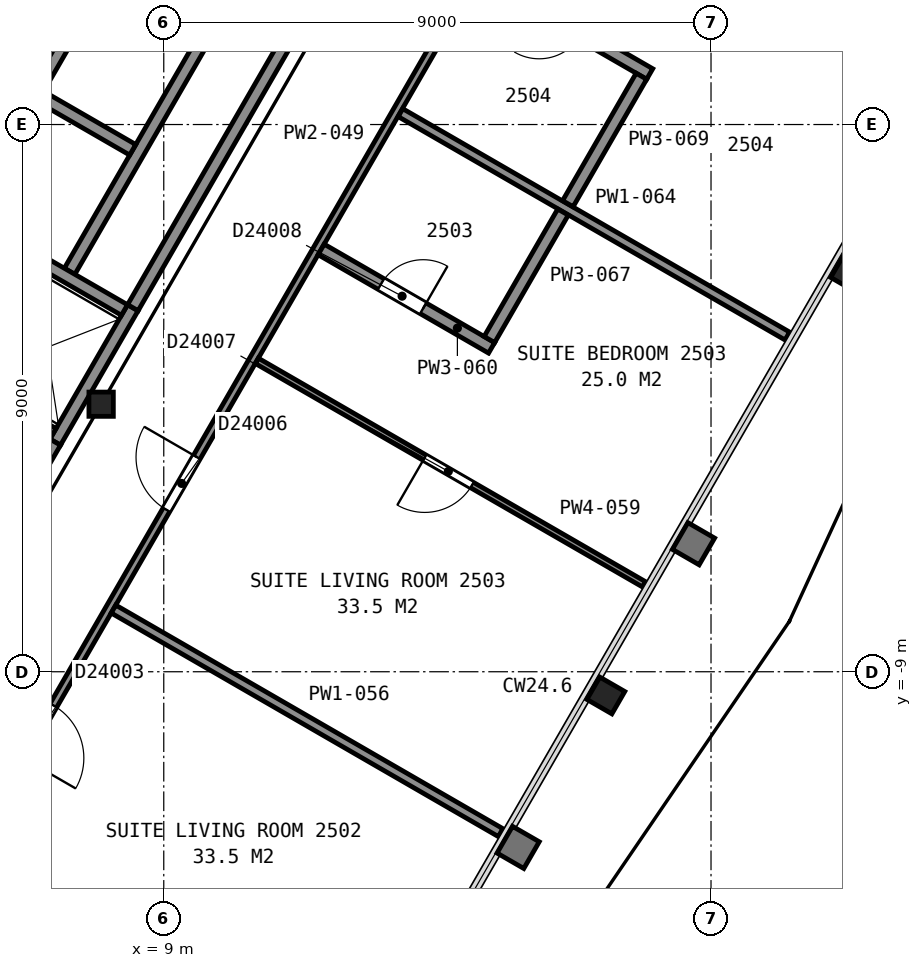
"""IFC4 building model, lengths in metres.
Left out: names, types, materials, properties, quantities, classifications, styles, units other than length and angle.
Written with IfcOpenShell. Run it as: python <this file> out.ifc"""

import sys

from ifc_helpers import new_model, si_unit, direction, frame, frame_2d, origin, origin_2d, place, context, subcontext, project, spatial, rectangle, i_section, extrude, element, fill, save


model = new_model("IFC4")
c1 = context("Model", 3, precision=1e-05, world=origin(), true_north=direction((0.0, 1.0)))
c2 = subcontext(c1, "Body", "Model", "MODEL_VIEW")
j1 = project(units=[si_unit("LENGTHUNIT", "METRE"), si_unit("PLANEANGLEUNIT", "RADIAN")], contexts=[c1])
p1 = place(None, origin())
s1 = spatial("IfcSite", under=j1, at=p1, CompositionType="ELEMENT")
p2 = place(p1, origin())
s2 = spatial("IfcBuilding", under=s1, at=p2, CompositionType="ELEMENT")
p3 = place(p2, frame((0.0, 0.0, 107.2)))
s3 = spatial("IfcBuildingStorey", under=s2, at=p3, CompositionType="ELEMENT", Elevation=107.2)
for number, where, z_axis, x_axis in (
    (1, (16.27, -9.39, 0.0), (0.0, 0.0, 1.0), (-0.5, -0.866, 0.0)),
    (2, (20.28, -2.45, 0.0), (0.0, 0.0, 1.0), (-0.5, -0.866, 0.0)),
):
    element("IfcColumn", number, at=place(p3, frame(where, z_axis=z_axis, x_axis=x_axis)), inside=s3, PredefinedType="COLUMN", context=c2, shape_type="SweptSolid", body=[
        extrude(i_section(OverallWidth=0.424, OverallDepth=0.475, WebThickness=0.048, FlangeThickness=0.077, FilletRadius=0.015, at=origin_2d()), origin(), (0.0, 0.0, 1.0), 3.6),
    ])
p4 = place(p3, frame((7.97, -4.6, 0.0), z_axis=(0.0, 0.0, 1.0), x_axis=(1.0, 0.0, 0.0)))
e3 = element("IfcColumn", 3, at=p4, inside=s3, PredefinedType="COLUMN", context=c2, shape_type="SweptSolid", body=[
    extrude(i_section(OverallWidth=0.401, OverallDepth=0.399, WebThickness=0.025, FlangeThickness=0.04, FilletRadius=0.015, at=origin_2d()), origin(), (0.0, 0.0, 1.0), 3.6),
])
p5 = place(p3, frame((7.216, -5.222, 0.0), z_axis=(0.0, 0.0, 1.0), x_axis=(0.499990435942, 0.866030925526, 0.0)))
e4 = element("IfcWall", 4, at=p5, inside=s3, PredefinedType="PARTITIONING", context=c2, shape_type="SweptSolid", body=[
    extrude(rectangle(XDim=2.55, YDim=0.2, at=frame_2d((1.275, 0.0))), origin(), (0.0, 0.0, 1.0), 3.6),
])
p6 = place(p3, frame((7.451, -2.414, 0.0), z_axis=(0.0, 0.0, 1.0), x_axis=(0.500016218704, 0.866016039709, 0.0)))
e5 = element("IfcWall", 5, at=p6, inside=s3, PredefinedType="PARTITIONING", context=c2, shape_type="SweptSolid", body=[
    extrude(rectangle(XDim=4.7, YDim=0.2, at=frame_2d((2.35, 0.0))), origin(), (0.0, 0.0, 1.0), 3.6),
])
p7 = place(p3, frame((5.663, -1.612, 0.0), z_axis=(0.0, 0.0, 1.0), x_axis=(0.49998122708, 0.866036242063, 0.0)))
e6 = element("IfcWall", 6, at=p7, inside=s3, PredefinedType="PARTITIONING", context=c2, shape_type="SweptSolid", body=[
    extrude(rectangle(XDim=4.9, YDim=0.2, at=frame_2d((2.45, 0.0))), origin(), (0.0, 0.0, 1.0), 3.6),
])
p8 = place(p3, frame((8.49, -0.416, 0.0), z_axis=(0.0, 0.0, 1.0), x_axis=(-0.866036909293, 0.499980071345, 0.0)))
e7 = element("IfcWall", 7, at=p8, inside=s3, PredefinedType="PARTITIONING", context=c2, shape_type="SweptSolid", body=[
    extrude(rectangle(XDim=1.75, YDim=0.2, at=frame_2d((0.875, 0.0))), origin(), (0.0, 0.0, 1.0), 3.6),
])
p9 = place(p3, frame((8.354, -3.051, 0.0), z_axis=(0.0, 0.0, 1.0), x_axis=(-0.866060182126, 0.499939757307, 0.0)))
e8 = element("IfcWall", 8, at=p9, inside=s3, PredefinedType="PARTITIONING", context=c2, shape_type="SweptSolid", body=[
    extrude(rectangle(XDim=2.95, YDim=0.2, at=frame_2d((1.475, 0.0))), origin(), (0.0, 0.0, 1.0), 3.6),
])
p10 = place(p3, frame((7.179, -5.086, 0.0), z_axis=(0.0, 0.0, 1.0), x_axis=(-0.866036909293, 0.499980071345, 0.0)))
e9 = element("IfcWall", 9, at=p10, inside=s3, PredefinedType="PARTITIONING", context=c2, shape_type="SweptSolid", body=[
    extrude(rectangle(XDim=1.75, YDim=0.2, at=frame_2d((0.875, 0.0))), origin(), (0.0, 0.0, 1.0), 3.6),
])
p11 = place(p3, frame((5.906, -7.49, 0.0), z_axis=(0.0, 0.0, 1.0), x_axis=(0.500252727967, 0.865879442048, 0.0)))
e10 = element("IfcWall", 10, at=p11, inside=s3, PredefinedType="PARTITIONING", context=c2, shape_type="SweptSolid", body=[
    extrude(rectangle(XDim=2.617, YDim=0.2, at=frame_2d((1.309, 0.0))), origin(), (0.0, 0.0, 1.0), 3.35),
])
p12 = place(p3, frame((8.492, -3.012, 0.0), z_axis=(0.0, 0.0, 1.0), x_axis=(0.499972957231, 0.866041016371, 0.0)))
e11 = element("IfcWall", 11, at=p12, inside=s3, PredefinedType="PARTITIONING", context=c2, shape_type="SweptSolid", body=[
    extrude(rectangle(XDim=10.349, YDim=0.2, at=frame_2d((5.174, 0.0))), origin(), (0.0, 0.0, 1.0), 3.35),
])
p13 = place(p3, frame((15.684, 5.165, 0.0), z_axis=(0.0, 0.0, 1.0), x_axis=(-0.500027787016, -0.866009360349, 0.0)))
e12 = element("IfcWall", 12, at=p13, inside=s3, PredefinedType="PARTITIONING", context=c2, shape_type="SweptSolid", body=[
    extrude(rectangle(XDim=23.856, YDim=0.125, at=frame_2d((11.928, 0.0))), origin(), (0.0, 0.0, 1.0), 2.613),
])
p14 = place(p13, frame((16.996, 0.0, 0.0)))
e13 = element("IfcOpeningElement", 13, at=p14, cuts=e12, PredefinedType="OPENING", context=c2, shape_type="SweptSolid", body=[
    extrude(rectangle(XDim=1.0, YDim=2.1, at=frame_2d((0.5, 1.05))), frame((0.0, 0.073, 0.0), z_axis=(0.0, -1.0, 0.0), x_axis=(1.0, 0.0, 0.0)), (0.0, 0.0, 1.0), 0.145),
])
p15 = place(p13, frame((12.28, 0.0, 0.0)))
e14 = element("IfcOpeningElement", 14, at=p15, cuts=e12, PredefinedType="OPENING", context=c2, shape_type="SweptSolid", body=[
    extrude(rectangle(XDim=1.0, YDim=2.1, at=frame_2d((0.5, 1.05))), frame((0.0, 0.073, 0.0), z_axis=(0.0, -1.0, 0.0), x_axis=(1.0, 0.0, 0.0)), (0.0, 0.0, 1.0), 0.145),
])
p16 = place(p3, frame((12.183, -15.729, 0.0), z_axis=(0.0, 0.0, 1.0), x_axis=(-0.866066702559, 0.499928461601, 0.0)))
e15 = element("IfcWall", 15, at=p16, inside=s3, PredefinedType="PARTITIONING", context=c2, shape_type="SweptSolid", body=[
    extrude(rectangle(XDim=7.352, YDim=0.1, at=frame_2d((3.676, 0.0))), origin(), (0.0, 0.0, 1.0), 2.613),
])
p17 = place(p16, frame((3.265, 0.0, 0.0)))
e16 = element("IfcOpeningElement", 16, at=p17, cuts=e15, PredefinedType="OPENING", context=c2, shape_type="SweptSolid", body=[
    extrude(rectangle(XDim=0.9, YDim=2.1, at=frame_2d((0.45, 1.05))), frame((0.0, 0.06, 0.0), z_axis=(0.0, -1.0, 0.0), x_axis=(1.0, 0.0, 0.0)), (0.0, 0.0, 1.0), 0.12),
])
p18 = place(p3, frame((8.173, -7.969, 0.0), z_axis=(0.0, 0.0, 1.0), x_axis=(0.86596990005, -0.500096122968, 0.0)))
e17 = element("IfcWall", 17, at=p18, inside=s3, PredefinedType="PARTITIONING", context=c2, shape_type="SweptSolid", body=[
    extrude(rectangle(XDim=7.352, YDim=0.15, at=frame_2d((3.676, 0.0))), origin(), (0.0, 0.0, 1.0), 2.613),
])
p19 = place(p3, frame((10.53, -3.886, 0.0), z_axis=(0.0, 0.0, 1.0), x_axis=(0.8660606245, -0.499938990969, 0.0)))
e18 = element("IfcWall", 18, at=p19, inside=s3, PredefinedType="PARTITIONING", context=c2, shape_type="SweptSolid", body=[
    extrude(rectangle(XDim=7.353, YDim=0.1, at=frame_2d((3.676, 0.0))), origin(), (0.0, 0.0, 1.0), 2.613),
])
p20 = place(p19, frame((3.188, 0.0, 0.0)))
e19 = element("IfcOpeningElement", 19, at=p20, cuts=e18, PredefinedType="OPENING", context=c2, shape_type="SweptSolid", body=[
    extrude(rectangle(XDim=0.9, YDim=2.1, at=frame_2d((0.45, 1.05))), frame((0.0, 0.06, 0.0), z_axis=(0.0, -1.0, 0.0), x_axis=(1.0, 0.0, 0.0)), (0.0, 0.0, 1.0), 0.12),
])
p21 = place(p3, frame((11.588, -2.054, 0.0), z_axis=(0.0, 0.0, 1.0), x_axis=(0.865983377851, -0.500072783988, 0.0)))
e20 = element("IfcWall", 20, at=p21, inside=s3, PredefinedType="PARTITIONING", context=c2, shape_type="SweptSolid", body=[
    extrude(rectangle(XDim=3.237, YDim=0.2, at=frame_2d((1.619, 0.0))), origin(), (0.0, 0.0, 1.0), 2.613),
])
p22 = place(p21, frame((1.137, 0.0, 0.0)))
e21 = element("IfcOpeningElement", 21, at=p22, cuts=e20, PredefinedType="OPENING", context=c2, shape_type="SweptSolid", body=[
    extrude(rectangle(XDim=0.8, YDim=2.1, at=frame_2d((0.4, 1.05))), frame((0.0, 0.11, 0.0), z_axis=(0.0, -1.0, 0.0), x_axis=(1.0, 0.0, 0.0)), (0.0, 0.0, 1.0), 0.22),
])
p23 = place(p3, frame((12.893, 0.195, 0.0), z_axis=(0.0, 0.0, 1.0), x_axis=(0.865995225926, -0.500052265941, 0.0)))
e22 = element("IfcWall", 22, at=p23, inside=s3, PredefinedType="PARTITIONING", context=c2, shape_type="SweptSolid", body=[
    extrude(rectangle(XDim=7.347, YDim=0.15, at=frame_2d((3.674, 0.0))), origin(), (0.0, 0.0, 1.0), 2.613),
])
p24 = place(p3, frame((16.992, 0.831, 0.0), z_axis=(0.0, 0.0, 1.0), x_axis=(-0.866022073929, 0.500005767435, 0.0)))
e23 = element("IfcWall", 23, at=p24, inside=s3, PredefinedType="PARTITIONING", context=c2, shape_type="SweptSolid", body=[
    extrude(rectangle(XDim=3.232, YDim=0.2, at=frame_2d((1.616, 0.0))), origin(), (0.0, 0.0, 1.0), 2.613),
])
p25 = place(p24, frame((1.3, 0.0, 0.0)))
e24 = element("IfcOpeningElement", 24, at=p25, cuts=e23, PredefinedType="OPENING", context=c2, shape_type="SweptSolid", body=[
    extrude(rectangle(XDim=0.8, YDim=2.1, at=frame_2d((0.4, 1.05))), frame((0.0, 0.11, 0.0), z_axis=(0.0, -1.0, 0.0), x_axis=(1.0, 0.0, 0.0)), (0.0, 0.0, 1.0), 0.22),
])
p26 = place(p3, frame((14.355, -3.536, 0.0), z_axis=(0.0, 0.0, 1.0), x_axis=(0.50002218001, 0.866012597771, 0.0)))
e25 = element("IfcWall", 25, at=p26, inside=s3, PredefinedType="PARTITIONING", context=c2, shape_type="SweptSolid", body=[
    extrude(rectangle(XDim=2.421, YDim=0.2, at=frame_2d((1.21, 0.0))), origin(), (0.0, 0.0, 1.0), 2.613),
])
p27 = place(p3, frame((21.613, 0.605, 0.0), z_axis=(0.0, 0.0, 1.0), x_axis=(-0.866021344046, 0.500007031608, 0.0)))
e26 = element("IfcWall", 26, at=p27, inside=s3, PredefinedType="PARTITIONING", context=c2, shape_type="SweptSolid", body=[
    extrude(rectangle(XDim=7.352, YDim=0.1, at=frame_2d((3.676, 0.0))), origin(), (0.0, 0.0, 1.0), 2.613),
])
p28 = place(p27, frame((3.264, 0.0, 0.0)))
e27 = element("IfcOpeningElement", 27, at=p28, cuts=e26, PredefinedType="OPENING", context=c2, shape_type="SweptSolid", body=[
    extrude(rectangle(XDim=0.9, YDim=2.1, at=frame_2d((0.45, 1.05))), frame((0.0, 0.06, 0.0), z_axis=(0.0, -1.0, 0.0), x_axis=(1.0, 0.0, 0.0)), (0.0, 0.0, 1.0), 0.12),
])
p29 = place(p3, frame((15.646, -1.302, 0.0), z_axis=(0.0, 0.0, 1.0), x_axis=(0.499719542643, 0.866187265377, 0.0)))
e28 = element("IfcWall", 28, at=p29, inside=s3, PredefinedType="PARTITIONING", context=c2, shape_type="SweptSolid", body=[
    extrude(rectangle(XDim=2.42, YDim=0.2, at=frame_2d((1.21, 0.0))), origin(), (0.0, 0.0, 1.0), 2.613),
])
p30 = place(p14, origin())
e29 = element("IfcDoor", 29, at=p30, inside=s3, OperationType="SINGLE_SWING_RIGHT", PredefinedType="DOOR", context=c2, shape_type="SweptSolid", body=[
    extrude(rectangle(XDim=1.0, YDim=2.1, at=frame_2d((0.5, 1.05))), frame((0.0, 0.025, 0.0), z_axis=(0.0, -1.0, 0.0), x_axis=(1.0, 0.0, 0.0)), (0.0, 0.0, 1.0), 0.05),
])
fill(e13, e29)
p31 = place(p15, origin())
e30 = element("IfcDoor", 30, at=p31, inside=s3, OperationType="SINGLE_SWING_LEFT", PredefinedType="DOOR", context=c2, shape_type="SweptSolid", body=[
    extrude(rectangle(XDim=1.0, YDim=2.1, at=frame_2d((0.5, 1.05))), frame((0.0, 0.025, 0.0), z_axis=(0.0, -1.0, 0.0), x_axis=(1.0, 0.0, 0.0)), (0.0, 0.0, 1.0), 0.05),
])
fill(e14, e30)
p32 = place(p20, origin())
e31 = element("IfcDoor", 31, at=p32, inside=s3, OperationType="SINGLE_SWING_LEFT", PredefinedType="DOOR", context=c2, shape_type="SweptSolid", body=[
    extrude(rectangle(XDim=0.9, YDim=2.1, at=frame_2d((0.45, 1.05))), frame((0.0, 0.025, 0.0), z_axis=(0.0, -1.0, 0.0), x_axis=(1.0, 0.0, 0.0)), (0.0, 0.0, 1.0), 0.05),
])
fill(e19, e31)
p33 = place(p22, origin())
e32 = element("IfcDoor", 32, at=p33, inside=s3, OperationType="SINGLE_SWING_RIGHT", PredefinedType="DOOR", context=c2, shape_type="SweptSolid", body=[
    extrude(rectangle(XDim=0.8, YDim=2.1, at=frame_2d((0.4, 1.05))), frame((0.0, 0.025, 0.0), z_axis=(0.0, -1.0, 0.0), x_axis=(1.0, 0.0, 0.0)), (0.0, 0.0, 1.0), 0.05),
])
fill(e21, e32)
save(model, sys.argv[1])
